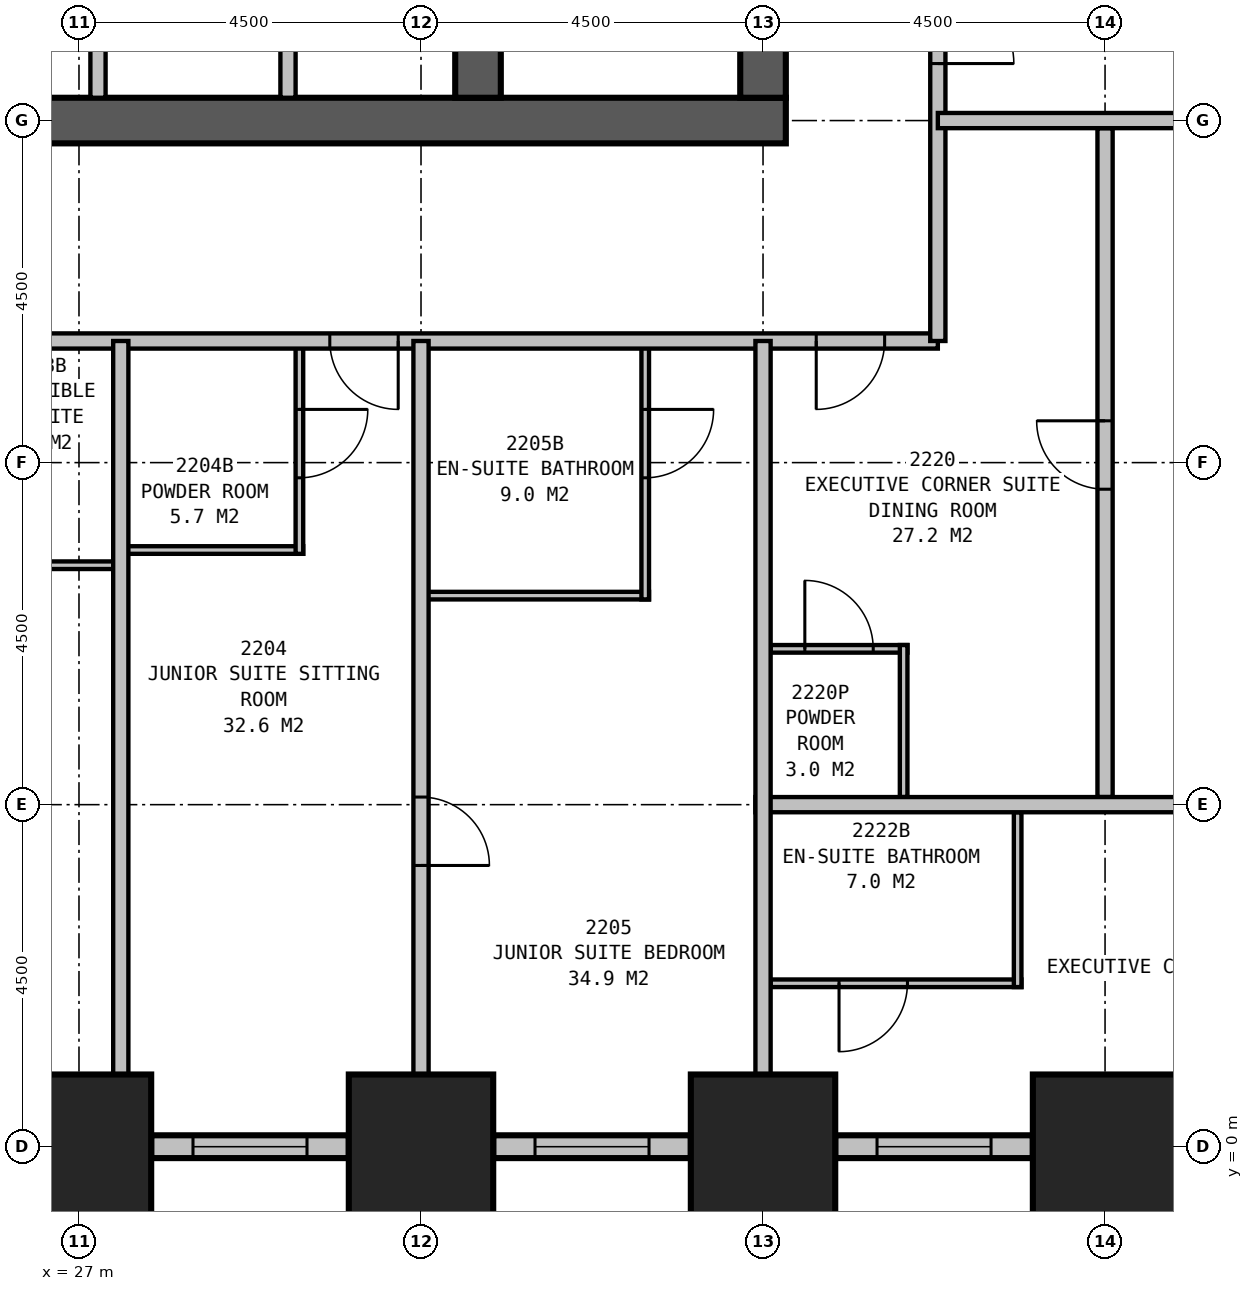
"""IFC4 building model, lengths in metres.
Left out: names, types, materials, properties, quantities, classifications, styles, units other than length and angle.
Written with IfcOpenShell. Run it as: python <this file> out.ifc"""

import sys

from ifc_helpers import new_model, si_unit, direction, frame, frame_2d, origin, origin_2d, place, context, subcontext, project, spatial, rectangle, extrude, element, fill, save


model = new_model("IFC4")
c1 = context("Model", 3, precision=1e-05, world=origin(), true_north=direction((0.0, 1.0)))
c2 = subcontext(c1, "Body", "Model", "MODEL_VIEW")
j1 = project(units=[si_unit("LENGTHUNIT", "METRE"), si_unit("PLANEANGLEUNIT", "RADIAN")], contexts=[c1])
p1 = place(None, origin())
s1 = spatial("IfcSite", under=j1, at=p1, CompositionType="ELEMENT")
p2 = place(p1, origin())
s2 = spatial("IfcBuilding", under=s1, at=p2, CompositionType="ELEMENT")
p3 = place(p2, frame((0.0, 0.0, 89.9)))
s3 = spatial("IfcBuildingStorey", under=s2, at=p3, CompositionType="ELEMENT", Elevation=89.9)
for number, where, z_axis, x_axis in (
    (1, (27.0, 0.0, 0.0), (0.0, 0.0, 1.0), (1.0, 0.0, 0.0)),
    (2, (31.5, 0.0, 0.0), (0.0, 0.0, 1.0), (1.0, 0.0, 0.0)),
    (3, (36.0, 0.0, 0.0), (0.0, 0.0, 1.0), (1.0, 0.0, 0.0)),
    (4, (40.5, 0.0, 0.0), (0.0, 0.0, 1.0), (1.0, 0.0, 0.0)),
):
    element("IfcColumn", number, at=place(p3, frame(where, z_axis=z_axis, x_axis=x_axis)), inside=s3, PredefinedType="COLUMN", context=c2, shape_type="SweptSolid", body=[
        extrude(rectangle(XDim=1.9, YDim=1.9, at=origin_2d()), origin(), (0.0, 0.0, 1.0), 3.5),
    ])
p4 = place(p3, frame((13.2, 13.5, 0.0), z_axis=(0.0, 0.0, 1.0), x_axis=(1.0, 0.0, 0.0)))
e5 = element("IfcWall", 5, at=p4, inside=s3, PredefinedType="SHEAR", context=c2, shape_type="SweptSolid", body=[
    extrude(rectangle(XDim=23.1, YDim=0.6, at=frame_2d((11.55, 0.0))), origin(), (0.0, 0.0, 1.0), 3.5),
])
p5 = place(p3, frame((32.25, 13.8, 0.0), z_axis=(0.0, 0.0, 1.0), x_axis=(0.0, 1.0, 0.0)))
e6 = element("IfcWall", 6, at=p5, inside=s3, PredefinedType="SHEAR", context=c2, shape_type="SweptSolid", body=[
    extrude(rectangle(XDim=12.9, YDim=0.6, at=frame_2d((6.45, 0.0))), origin(), (0.0, 0.0, 1.0), 3.5),
])
p6 = place(p5, frame((5.05, 0.0, 0.0), z_axis=(0.0, 0.0, 1.0), x_axis=(-1.0, 0.0, 0.0)))
e7 = element("IfcOpeningElement", 7, at=p6, cuts=e6, PredefinedType="OPENING", context=c2, shape_type="SweptSolid", body=[
    extrude(rectangle(XDim=1.2, YDim=2.1, at=frame_2d((0.6, 1.05))), frame((0.0, 0.31, 0.0), z_axis=(0.0, -1.0, 0.0), x_axis=(1.0, 0.0, 0.0)), (0.0, 0.0, 1.0), 0.62),
])
p7 = place(p3, frame((36.0, 13.8, 0.0), z_axis=(0.0, 0.0, 1.0), x_axis=(0.0, 1.0, 0.0)))
e8 = element("IfcWall", 8, at=p7, inside=s3, PredefinedType="SHEAR", context=c2, shape_type="SweptSolid", body=[
    extrude(rectangle(XDim=2.7, YDim=0.6, at=frame_2d((1.35, 0.0))), origin(), (0.0, 0.0, 1.0), 3.5),
])
p8 = place(p3, frame((27.95, 0.0, 0.0), z_axis=(0.0, 0.0, 1.0), x_axis=(1.0, 0.0, 0.0)))
e9 = element("IfcWall", 9, at=p8, inside=s3, PredefinedType="STANDARD", context=c2, shape_type="SweptSolid", body=[
    extrude(rectangle(XDim=2.6, YDim=0.3, at=frame_2d((1.3, 0.0))), origin(), (0.0, 0.0, 1.0), 2.15),
])
p9 = place(p8, frame((0.55, 0.0, 0.5)))
e10 = element("IfcOpeningElement", 10, at=p9, cuts=e9, PredefinedType="OPENING", context=c2, shape_type="SweptSolid", body=[
    extrude(rectangle(XDim=1.5, YDim=1.5, at=frame_2d((0.75, 0.75))), frame((0.0, 0.16, 0.0), z_axis=(0.0, -1.0, 0.0), x_axis=(1.0, 0.0, 0.0)), (0.0, 0.0, 1.0), 0.32),
])
p10 = place(p3, frame((32.45, 0.0, 0.0), z_axis=(0.0, 0.0, 1.0), x_axis=(1.0, 0.0, 0.0)))
e11 = element("IfcWall", 11, at=p10, inside=s3, PredefinedType="STANDARD", context=c2, shape_type="SweptSolid", body=[
    extrude(rectangle(XDim=2.6, YDim=0.3, at=frame_2d((1.3, 0.0))), origin(), (0.0, 0.0, 1.0), 2.15),
])
p11 = place(p10, frame((0.55, 0.0, 0.5)))
e12 = element("IfcOpeningElement", 12, at=p11, cuts=e11, PredefinedType="OPENING", context=c2, shape_type="SweptSolid", body=[
    extrude(rectangle(XDim=1.5, YDim=1.5, at=frame_2d((0.75, 0.75))), frame((0.0, 0.16, 0.0), z_axis=(0.0, -1.0, 0.0), x_axis=(1.0, 0.0, 0.0)), (0.0, 0.0, 1.0), 0.32),
])
p12 = place(p3, frame((36.95, 0.0, 0.0), z_axis=(0.0, 0.0, 1.0), x_axis=(1.0, 0.0, 0.0)))
e13 = element("IfcWall", 13, at=p12, inside=s3, PredefinedType="STANDARD", context=c2, shape_type="SweptSolid", body=[
    extrude(rectangle(XDim=2.6, YDim=0.3, at=frame_2d((1.3, 0.0))), origin(), (0.0, 0.0, 1.0), 2.15),
])
p13 = place(p12, frame((0.55, 0.0, 0.5)))
e14 = element("IfcOpeningElement", 14, at=p13, cuts=e13, PredefinedType="OPENING", context=c2, shape_type="SweptSolid", body=[
    extrude(rectangle(XDim=1.5, YDim=1.5, at=frame_2d((0.75, 0.75))), frame((0.0, 0.16, 0.0), z_axis=(0.0, -1.0, 0.0), x_axis=(1.0, 0.0, 0.0)), (0.0, 0.0, 1.0), 0.32),
])
p14 = place(p3, frame((11.2, 10.6, 0.0), z_axis=(0.0, 0.0, 1.0), x_axis=(1.0, 0.0, 0.0)))
e15 = element("IfcWall", 15, at=p14, inside=s3, PredefinedType="PARTITIONING", context=c2, shape_type="SweptSolid", body=[
    extrude(rectangle(XDim=27.1, YDim=0.2, at=frame_2d((13.55, 0.0))), origin(), (0.0, 0.0, 1.0), 3.25),
])
p15 = place(p14, frame((5.95, 0.0, 0.0), z_axis=(0.0, 0.0, 1.0), x_axis=(-1.0, 0.0, 0.0)))
e16 = element("IfcOpeningElement", 16, at=p15, cuts=e15, PredefinedType="OPENING", context=c2, shape_type="SweptSolid", body=[
    extrude(rectangle(XDim=0.9, YDim=2.1, at=frame_2d((0.45, 1.05))), frame((0.0, 0.11, 0.0), z_axis=(0.0, -1.0, 0.0), x_axis=(1.0, 0.0, 0.0)), (0.0, 0.0, 1.0), 0.22),
])
p16 = place(p14, frame((13.2, 0.0, 0.0), z_axis=(0.0, 0.0, 1.0), x_axis=(-1.0, 0.0, 0.0)))
e17 = element("IfcOpeningElement", 17, at=p16, cuts=e15, PredefinedType="OPENING", context=c2, shape_type="SweptSolid", body=[
    extrude(rectangle(XDim=1.0, YDim=2.1, at=frame_2d((0.5, 1.05))), frame((0.0, 0.11, 0.0), z_axis=(0.0, -1.0, 0.0), x_axis=(1.0, 0.0, 0.0)), (0.0, 0.0, 1.0), 0.22),
])
p17 = place(p14, frame((20.0, 0.0, 0.0), z_axis=(0.0, 0.0, 1.0), x_axis=(-1.0, 0.0, 0.0)))
e18 = element("IfcOpeningElement", 18, at=p17, cuts=e15, PredefinedType="OPENING", context=c2, shape_type="SweptSolid", body=[
    extrude(rectangle(XDim=0.9, YDim=2.1, at=frame_2d((0.45, 1.05))), frame((0.0, 0.11, 0.0), z_axis=(0.0, -1.0, 0.0), x_axis=(1.0, 0.0, 0.0)), (0.0, 0.0, 1.0), 0.22),
])
p18 = place(p14, frame((1.6, 0.0, 0.0), z_axis=(0.0, 0.0, 1.0), x_axis=(-1.0, 0.0, 0.0)))
e19 = element("IfcOpeningElement", 19, at=p18, cuts=e15, PredefinedType="OPENING", context=c2, shape_type="SweptSolid", body=[
    extrude(rectangle(XDim=0.9, YDim=2.1, at=frame_2d((0.45, 1.05))), frame((0.0, 0.11, 0.0), z_axis=(0.0, -1.0, 0.0), x_axis=(1.0, 0.0, 0.0)), (0.0, 0.0, 1.0), 0.22),
])
p19 = place(p14, frame((26.4, 0.0, 0.0), z_axis=(0.0, 0.0, 1.0), x_axis=(-1.0, 0.0, 0.0)))
e20 = element("IfcOpeningElement", 20, at=p19, cuts=e15, PredefinedType="OPENING", context=c2, shape_type="SweptSolid", body=[
    extrude(rectangle(XDim=0.9, YDim=2.1, at=frame_2d((0.45, 1.05))), frame((0.0, 0.11, 0.0), z_axis=(0.0, -1.0, 0.0), x_axis=(1.0, 0.0, 0.0)), (0.0, 0.0, 1.0), 0.22),
])
p20 = place(p3, frame((38.3, 10.6, 0.0), z_axis=(0.0, 0.0, 1.0), x_axis=(0.0, 1.0, 0.0)))
e21 = element("IfcWall", 21, at=p20, inside=s3, PredefinedType="PARTITIONING", context=c2, shape_type="SweptSolid", body=[
    extrude(rectangle(XDim=19.3, YDim=0.2, at=frame_2d((9.65, 0.0))), origin(), (0.0, 0.0, 1.0), 3.25),
])
p21 = place(p20, frame((4.65, 0.0, 0.0), z_axis=(0.0, 0.0, 1.0), x_axis=(-1.0, 0.0, 0.0)))
e22 = element("IfcOpeningElement", 22, at=p21, cuts=e21, PredefinedType="OPENING", context=c2, shape_type="SweptSolid", body=[
    extrude(rectangle(XDim=1.0, YDim=2.1, at=frame_2d((0.5, 1.05))), frame((0.0, 0.11, 0.0), z_axis=(0.0, -1.0, 0.0), x_axis=(1.0, 0.0, 0.0)), (0.0, 0.0, 1.0), 0.22),
])
p22 = place(p20, frame((9.95, 0.0, 0.0), z_axis=(0.0, 0.0, 1.0), x_axis=(-1.0, 0.0, 0.0)))
e23 = element("IfcOpeningElement", 23, at=p22, cuts=e21, PredefinedType="OPENING", context=c2, shape_type="SweptSolid", body=[
    extrude(rectangle(XDim=0.9, YDim=2.1, at=frame_2d((0.45, 1.05))), frame((0.0, 0.11, 0.0), z_axis=(0.0, -1.0, 0.0), x_axis=(1.0, 0.0, 0.0)), (0.0, 0.0, 1.0), 0.22),
])
p23 = place(p3, frame((27.55, 10.6, 0.0), z_axis=(0.0, 0.0, 1.0), x_axis=(0.0, -1.0, 0.0)))
e24 = element("IfcWall", 24, at=p23, inside=s3, PredefinedType="PARTITIONING", context=c2, shape_type="SweptSolid", body=[
    extrude(rectangle(XDim=10.6, YDim=0.2, at=frame_2d((5.3, 0.0))), origin(), (0.0, 0.0, 1.0), 2.25),
])
p24 = place(p3, frame((31.5, 10.6, 0.0), z_axis=(0.0, 0.0, 1.0), x_axis=(0.0, -1.0, 0.0)))
e25 = element("IfcWall", 25, at=p24, inside=s3, PredefinedType="PARTITIONING", context=c2, shape_type="SweptSolid", body=[
    extrude(rectangle(XDim=10.6, YDim=0.2, at=frame_2d((5.3, 0.0))), origin(), (0.0, 0.0, 1.0), 2.25),
])
p25 = place(p24, frame((6.0, 0.0, 0.0)))
e26 = element("IfcOpeningElement", 26, at=p25, cuts=e25, PredefinedType="OPENING", context=c2, shape_type="SweptSolid", body=[
    extrude(rectangle(XDim=0.9, YDim=2.1, at=frame_2d((0.45, 1.05))), frame((0.0, 0.11, 0.0), z_axis=(0.0, -1.0, 0.0), x_axis=(1.0, 0.0, 0.0)), (0.0, 0.0, 1.0), 0.22),
])
p26 = place(p3, frame((24.75, 7.65, 0.0), z_axis=(0.0, 0.0, 1.0), x_axis=(1.0, 0.0, 0.0)))
e27 = element("IfcWall", 27, at=p26, inside=s3, PredefinedType="PLUMBINGWALL", context=c2, shape_type="SweptSolid", body=[
    extrude(rectangle(XDim=2.8, YDim=0.1, at=frame_2d((1.4, 0.0))), origin(), (0.0, 0.0, 1.0), 3.25),
])
p27 = place(p3, frame((27.55, 7.85, 0.0), z_axis=(0.0, 0.0, 1.0), x_axis=(1.0, 0.0, 0.0)))
e28 = element("IfcWall", 28, at=p27, inside=s3, PredefinedType="PLUMBINGWALL", context=c2, shape_type="SweptSolid", body=[
    extrude(rectangle(XDim=2.4, YDim=0.1, at=frame_2d((1.2, 0.0))), origin(), (0.0, 0.0, 1.0), 3.25),
])
p28 = place(p3, frame((29.9, 10.6, 0.0), z_axis=(0.0, 0.0, 1.0), x_axis=(0.0, -1.0, 0.0)))
e29 = element("IfcWall", 29, at=p28, inside=s3, PredefinedType="PLUMBINGWALL", context=c2, shape_type="SweptSolid", body=[
    extrude(rectangle(XDim=2.8, YDim=0.1, at=frame_2d((1.4, 0.0))), origin(), (0.0, 0.0, 1.0), 3.25),
])
p29 = place(p28, frame((0.9, 0.0, 0.0)))
e30 = element("IfcOpeningElement", 30, at=p29, cuts=e29, PredefinedType="OPENING", context=c2, shape_type="SweptSolid", body=[
    extrude(rectangle(XDim=0.9, YDim=2.1, at=frame_2d((0.45, 1.05))), frame((0.0, 0.06, 0.0), z_axis=(0.0, -1.0, 0.0), x_axis=(1.0, 0.0, 0.0)), (0.0, 0.0, 1.0), 0.12),
])
p30 = place(p3, frame((31.5, 7.25, 0.0), z_axis=(0.0, 0.0, 1.0), x_axis=(1.0, 0.0, 0.0)))
e31 = element("IfcWall", 31, at=p30, inside=s3, PredefinedType="PLUMBINGWALL", context=c2, shape_type="SweptSolid", body=[
    extrude(rectangle(XDim=3.0, YDim=0.1, at=frame_2d((1.5, 0.0))), origin(), (0.0, 0.0, 1.0), 3.25),
])
p31 = place(p3, frame((34.45, 10.6, 0.0), z_axis=(0.0, 0.0, 1.0), x_axis=(0.0, -1.0, 0.0)))
e32 = element("IfcWall", 32, at=p31, inside=s3, PredefinedType="PLUMBINGWALL", context=c2, shape_type="SweptSolid", body=[
    extrude(rectangle(XDim=3.4, YDim=0.1, at=frame_2d((1.7, 0.0))), origin(), (0.0, 0.0, 1.0), 3.25),
])
p32 = place(p31, frame((0.9, 0.0, 0.0)))
e33 = element("IfcOpeningElement", 33, at=p32, cuts=e32, PredefinedType="OPENING", context=c2, shape_type="SweptSolid", body=[
    extrude(rectangle(XDim=0.9, YDim=2.1, at=frame_2d((0.45, 1.05))), frame((0.0, 0.06, 0.0), z_axis=(0.0, -1.0, 0.0), x_axis=(1.0, 0.0, 0.0)), (0.0, 0.0, 1.0), 0.12),
])
p33 = place(p3, frame((38.3, 13.5, 0.0), z_axis=(0.0, 0.0, 1.0), x_axis=(1.0, 0.0, 0.0)))
e34 = element("IfcWall", 34, at=p33, inside=s3, PredefinedType="PARTITIONING", context=c2, shape_type="SweptSolid", body=[
    extrude(rectangle(XDim=9.921, YDim=0.2, at=frame_2d((4.96, 0.0))), origin(), (0.0, 0.0, 1.0), 1.95),
])
p34 = place(p3, frame((36.0, 10.6, 0.0), z_axis=(0.0, 0.0, 1.0), x_axis=(0.0, -1.0, 0.0)))
e35 = element("IfcWall", 35, at=p34, inside=s3, PredefinedType="PARTITIONING", context=c2, shape_type="SweptSolid", body=[
    extrude(rectangle(XDim=10.6, YDim=0.2, at=frame_2d((5.3, 0.0))), origin(), (0.0, 0.0, 1.0), 2.25),
])
p35 = place(p3, frame((35.9, 4.5, 0.0), z_axis=(0.0, 0.0, 1.0), x_axis=(1.0, 0.0, 0.0)))
e36 = element("IfcWall", 36, at=p35, inside=s3, PredefinedType="PARTITIONING", context=c2, shape_type="SweptSolid", body=[
    extrude(rectangle(XDim=9.1, YDim=0.2, at=frame_2d((4.55, 0.0))), origin(), (0.0, 0.0, 1.0), 3.25),
])
p36 = place(p35, frame((7.1, 0.0, 0.0)))
e37 = element("IfcOpeningElement", 37, at=p36, cuts=e36, PredefinedType="OPENING", context=c2, shape_type="SweptSolid", body=[
    extrude(rectangle(XDim=0.9, YDim=2.1, at=frame_2d((0.45, 1.05))), frame((0.0, 0.11, 0.0), z_axis=(0.0, -1.0, 0.0), x_axis=(1.0, 0.0, 0.0)), (0.0, 0.0, 1.0), 0.22),
])
p37 = place(p3, frame((40.5, 4.6, 0.0), z_axis=(0.0, 0.0, 1.0), x_axis=(0.0, 1.0, 0.0)))
e38 = element("IfcWall", 38, at=p37, inside=s3, PredefinedType="PARTITIONING", context=c2, shape_type="SweptSolid", body=[
    extrude(rectangle(XDim=8.8, YDim=0.2, at=frame_2d((4.4, 0.0))), origin(), (0.0, 0.0, 1.0), 2.25),
])
p38 = place(p37, frame((4.05, 0.0, 0.0)))
e39 = element("IfcOpeningElement", 39, at=p38, cuts=e38, PredefinedType="OPENING", context=c2, shape_type="SweptSolid", body=[
    extrude(rectangle(XDim=0.9, YDim=2.1, at=frame_2d((0.45, 1.05))), frame((0.0, 0.11, 0.0), z_axis=(0.0, -1.0, 0.0), x_axis=(1.0, 0.0, 0.0)), (0.0, 0.0, 1.0), 0.22),
])
p39 = place(p3, frame((37.85, 4.6, 0.0), z_axis=(0.0, 0.0, 1.0), x_axis=(0.0, 1.0, 0.0)))
e40 = element("IfcWall", 40, at=p39, inside=s3, PredefinedType="PLUMBINGWALL", context=c2, shape_type="SweptSolid", body=[
    extrude(rectangle(XDim=2.0, YDim=0.1, at=frame_2d((1.0, 0.0))), origin(), (0.0, 0.0, 1.0), 3.25),
])
p40 = place(p3, frame((36.1, 6.55, 0.0), z_axis=(0.0, 0.0, 1.0), x_axis=(1.0, 0.0, 0.0)))
e41 = element("IfcWall", 41, at=p40, inside=s3, PredefinedType="PLUMBINGWALL", context=c2, shape_type="SweptSolid", body=[
    extrude(rectangle(XDim=1.8, YDim=0.1, at=frame_2d((0.9, 0.0))), origin(), (0.0, 0.0, 1.0), 3.25),
])
p41 = place(p40, frame((0.45, 0.0, 0.0)))
e42 = element("IfcOpeningElement", 42, at=p41, cuts=e41, PredefinedType="OPENING", context=c2, shape_type="SweptSolid", body=[
    extrude(rectangle(XDim=0.9, YDim=2.1, at=frame_2d((0.45, 1.05))), frame((0.0, 0.06, 0.0), z_axis=(0.0, -1.0, 0.0), x_axis=(1.0, 0.0, 0.0)), (0.0, 0.0, 1.0), 0.12),
])
p42 = place(p3, frame((39.35, 4.4, 0.0), z_axis=(0.0, 0.0, 1.0), x_axis=(0.0, -1.0, 0.0)))
e43 = element("IfcWall", 43, at=p42, inside=s3, PredefinedType="PLUMBINGWALL", context=c2, shape_type="SweptSolid", body=[
    extrude(rectangle(XDim=2.3, YDim=0.1, at=frame_2d((1.15, 0.0))), origin(), (0.0, 0.0, 1.0), 3.25),
])
p43 = place(p3, frame((36.1, 2.15, 0.0), z_axis=(0.0, 0.0, 1.0), x_axis=(1.0, 0.0, 0.0)))
e44 = element("IfcWall", 44, at=p43, inside=s3, PredefinedType="PLUMBINGWALL", context=c2, shape_type="SweptSolid", body=[
    extrude(rectangle(XDim=3.3, YDim=0.1, at=frame_2d((1.65, 0.0))), origin(), (0.0, 0.0, 1.0), 3.25),
])
p44 = place(p43, frame((1.8, 0.0, 0.0), z_axis=(0.0, 0.0, 1.0), x_axis=(-1.0, 0.0, 0.0)))
e45 = element("IfcOpeningElement", 45, at=p44, cuts=e44, PredefinedType="OPENING", context=c2, shape_type="SweptSolid", body=[
    extrude(rectangle(XDim=0.9, YDim=2.1, at=frame_2d((0.45, 1.05))), frame((0.0, 0.06, 0.0), z_axis=(0.0, -1.0, 0.0), x_axis=(1.0, 0.0, 0.0)), (0.0, 0.0, 1.0), 0.12),
])
for number, where, z_axis, x_axis in (
    (46, (27.25, 13.8, 0.0), (0.0, 0.0, 1.0), (0.0, 1.0, 0.0)),
    (47, (29.75, 13.8, 0.0), (0.0, 0.0, 1.0), (0.0, 1.0, 0.0)),
):
    element("IfcWall", number, at=place(p3, frame(where, z_axis=z_axis, x_axis=x_axis)), inside=s3, PredefinedType="PARTITIONING", context=c2, shape_type="SweptSolid", body=[
        extrude(rectangle(XDim=2.4, YDim=0.2, at=frame_2d((1.2, 0.0))), origin(), (0.0, 0.0, 1.0), 3.25),
    ])
p45 = place(p9, origin())
e48 = element("IfcWindow", 48, at=p45, inside=s3, PartitioningType="SINGLE_PANEL", PredefinedType="WINDOW", context=c2, shape_type="SweptSolid", body=[
    extrude(rectangle(XDim=1.5, YDim=1.5, at=frame_2d((0.75, 0.75))), frame((0.0, 0.03, 0.0), z_axis=(0.0, -1.0, 0.0), x_axis=(1.0, 0.0, 0.0)), (0.0, 0.0, 1.0), 0.06),
])
fill(e10, e48)
p46 = place(p11, origin())
e49 = element("IfcWindow", 49, at=p46, inside=s3, PartitioningType="SINGLE_PANEL", PredefinedType="WINDOW", context=c2, shape_type="SweptSolid", body=[
    extrude(rectangle(XDim=1.5, YDim=1.5, at=frame_2d((0.75, 0.75))), frame((0.0, 0.03, 0.0), z_axis=(0.0, -1.0, 0.0), x_axis=(1.0, 0.0, 0.0)), (0.0, 0.0, 1.0), 0.06),
])
fill(e12, e49)
p47 = place(p13, origin())
e50 = element("IfcWindow", 50, at=p47, inside=s3, PartitioningType="SINGLE_PANEL", PredefinedType="WINDOW", context=c2, shape_type="SweptSolid", body=[
    extrude(rectangle(XDim=1.5, YDim=1.5, at=frame_2d((0.75, 0.75))), frame((0.0, 0.03, 0.0), z_axis=(0.0, -1.0, 0.0), x_axis=(1.0, 0.0, 0.0)), (0.0, 0.0, 1.0), 0.06),
])
fill(e14, e50)
p48 = place(p17, origin())
e51 = element("IfcDoor", 51, at=p48, inside=s3, OperationType="SINGLE_SWING_LEFT", PredefinedType="DOOR", context=c2, shape_type="SweptSolid", body=[
    extrude(rectangle(XDim=0.9, YDim=2.1, at=frame_2d((0.45, 1.05))), frame((0.0, 0.025, 0.0), z_axis=(0.0, -1.0, 0.0), x_axis=(1.0, 0.0, 0.0)), (0.0, 0.0, 1.0), 0.05),
])
fill(e18, e51)
p49 = place(p19, origin())
e52 = element("IfcDoor", 52, at=p49, inside=s3, OperationType="SINGLE_SWING_RIGHT", PredefinedType="DOOR", context=c2, shape_type="SweptSolid", body=[
    extrude(rectangle(XDim=0.9, YDim=2.1, at=frame_2d((0.45, 1.05))), frame((0.0, 0.025, 0.0), z_axis=(0.0, -1.0, 0.0), x_axis=(1.0, 0.0, 0.0)), (0.0, 0.0, 1.0), 0.05),
])
fill(e20, e52)
p50 = place(p21, origin())
e53 = element("IfcDoor", 53, at=p50, inside=s3, OperationType="SINGLE_SWING_RIGHT", PredefinedType="DOOR", context=c2, shape_type="SweptSolid", body=[
    extrude(rectangle(XDim=1.0, YDim=2.1, at=frame_2d((0.5, 1.05))), frame((0.0, 0.025, 0.0), z_axis=(0.0, -1.0, 0.0), x_axis=(1.0, 0.0, 0.0)), (0.0, 0.0, 1.0), 0.05),
])
fill(e22, e53)
p51 = place(p25, origin())
e54 = element("IfcDoor", 54, at=p51, inside=s3, OperationType="SINGLE_SWING_RIGHT", PredefinedType="DOOR", context=c2, shape_type="SweptSolid", body=[
    extrude(rectangle(XDim=0.9, YDim=2.1, at=frame_2d((0.45, 1.05))), frame((0.0, 0.025, 0.0), z_axis=(0.0, -1.0, 0.0), x_axis=(1.0, 0.0, 0.0)), (0.0, 0.0, 1.0), 0.05),
])
fill(e26, e54)
p52 = place(p29, origin())
e55 = element("IfcDoor", 55, at=p52, inside=s3, OperationType="SINGLE_SWING_LEFT", PredefinedType="DOOR", context=c2, shape_type="SweptSolid", body=[
    extrude(rectangle(XDim=0.9, YDim=2.1, at=frame_2d((0.45, 1.05))), frame((0.0, 0.025, 0.0), z_axis=(0.0, -1.0, 0.0), x_axis=(1.0, 0.0, 0.0)), (0.0, 0.0, 1.0), 0.05),
])
fill(e30, e55)
p53 = place(p32, origin())
e56 = element("IfcDoor", 56, at=p53, inside=s3, OperationType="SINGLE_SWING_LEFT", PredefinedType="DOOR", context=c2, shape_type="SweptSolid", body=[
    extrude(rectangle(XDim=0.9, YDim=2.1, at=frame_2d((0.45, 1.05))), frame((0.0, 0.025, 0.0), z_axis=(0.0, -1.0, 0.0), x_axis=(1.0, 0.0, 0.0)), (0.0, 0.0, 1.0), 0.05),
])
fill(e33, e56)
p54 = place(p38, origin())
e57 = element("IfcDoor", 57, at=p54, inside=s3, OperationType="SINGLE_SWING_RIGHT", PredefinedType="DOOR", context=c2, shape_type="SweptSolid", body=[
    extrude(rectangle(XDim=0.9, YDim=2.1, at=frame_2d((0.45, 1.05))), frame((0.0, 0.025, 0.0), z_axis=(0.0, -1.0, 0.0), x_axis=(1.0, 0.0, 0.0)), (0.0, 0.0, 1.0), 0.05),
])
fill(e39, e57)
p55 = place(p41, origin())
e58 = element("IfcDoor", 58, at=p55, inside=s3, OperationType="SINGLE_SWING_LEFT", PredefinedType="DOOR", context=c2, shape_type="SweptSolid", body=[
    extrude(rectangle(XDim=0.9, YDim=2.1, at=frame_2d((0.45, 1.05))), frame((0.0, 0.025, 0.0), z_axis=(0.0, -1.0, 0.0), x_axis=(1.0, 0.0, 0.0)), (0.0, 0.0, 1.0), 0.05),
])
fill(e42, e58)
p56 = place(p44, origin())
e59 = element("IfcDoor", 59, at=p56, inside=s3, OperationType="SINGLE_SWING_RIGHT", PredefinedType="DOOR", context=c2, shape_type="SweptSolid", body=[
    extrude(rectangle(XDim=0.9, YDim=2.1, at=frame_2d((0.45, 1.05))), frame((0.0, 0.025, 0.0), z_axis=(0.0, -1.0, 0.0), x_axis=(1.0, 0.0, 0.0)), (0.0, 0.0, 1.0), 0.05),
])
fill(e45, e59)
save(model, sys.argv[1])
